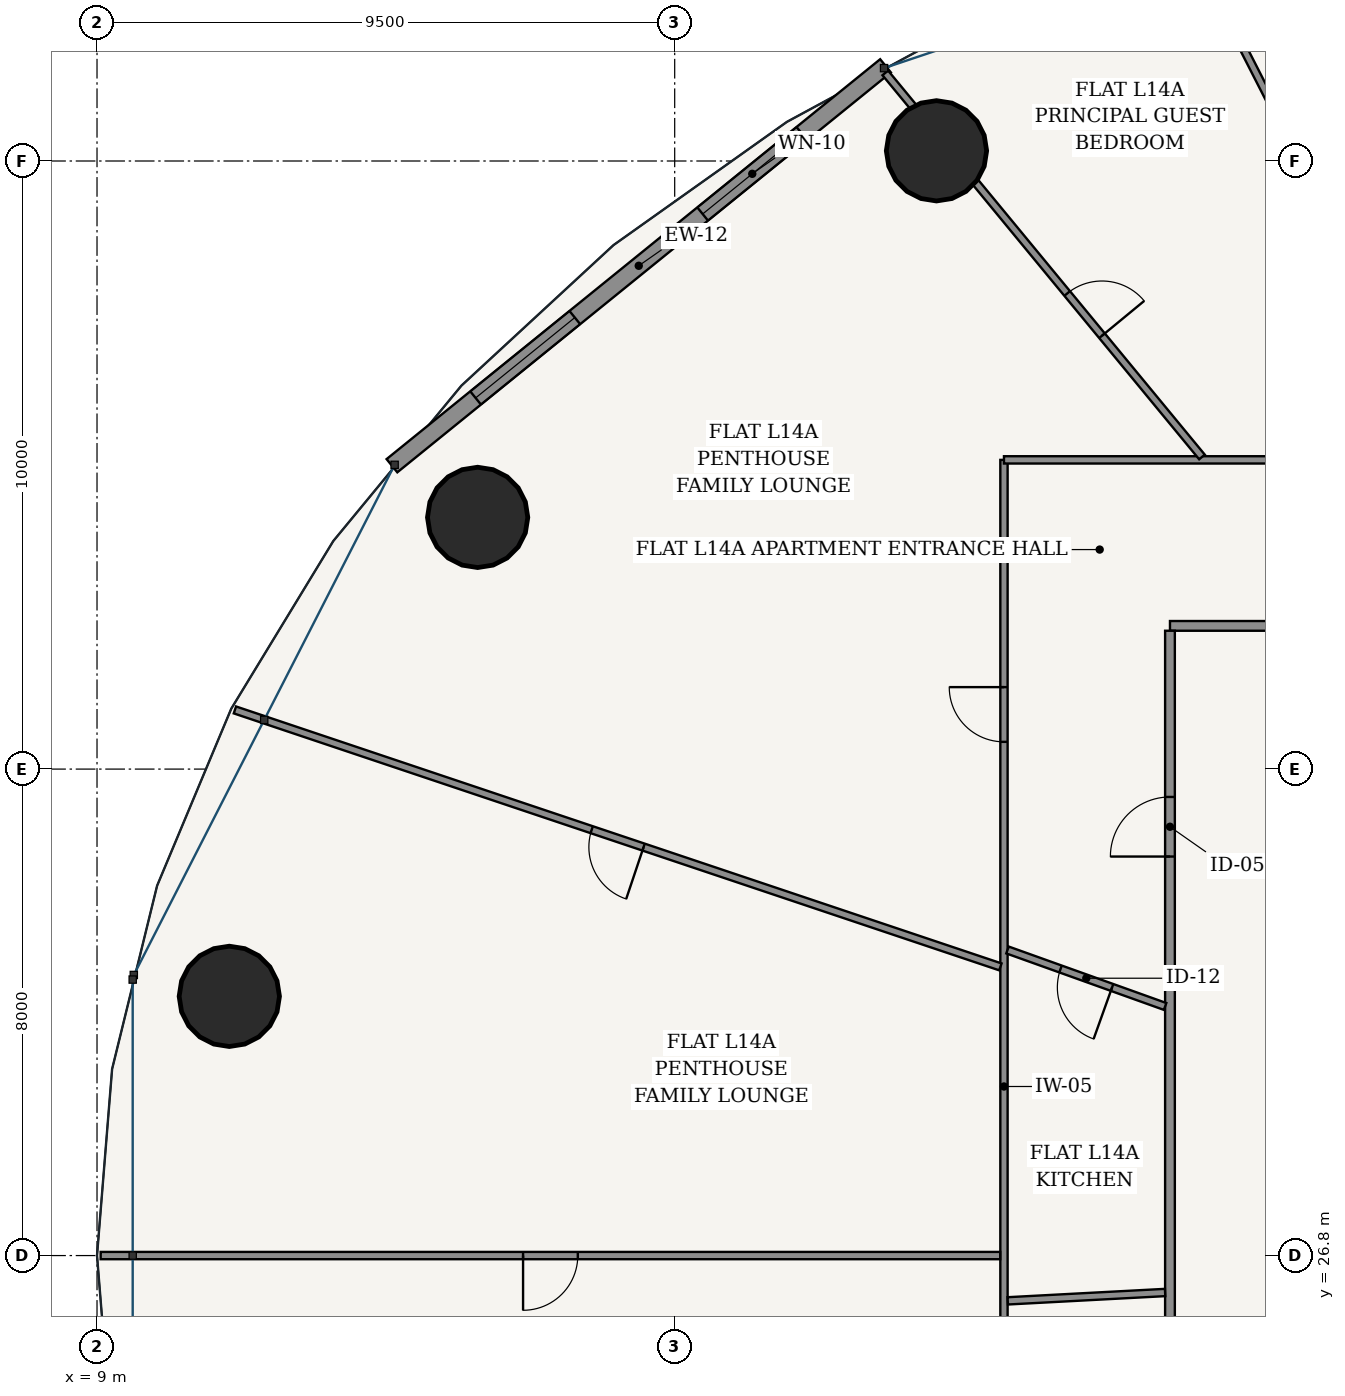
"""IFC4 building model, lengths in metres.
Left out: names, types, materials, properties, quantities, classifications, styles, units other than length and angle.
Written with IfcOpenShell. Run it as: python <this file> out.ifc"""

import sys

from ifc_helpers import new_model, si_unit, direction, frame, frame_2d, origin, origin_2d, place, context, subcontext, project, spatial, rectangle, hollow_circle, extrude, source, transform, mapped, element, fill, save


model = new_model("IFC4")
c1 = context("Model", 3, precision=1e-05, world=origin(), true_north=direction((-0.2419218956, 0.970295726276)))
c2 = subcontext(c1, "Body", "Model", "MODEL_VIEW")
j1 = project(units=[si_unit("LENGTHUNIT", "METRE"), si_unit("PLANEANGLEUNIT", "RADIAN")], contexts=[c1])
p1 = place(None, origin())
s1 = spatial("IfcSite", under=j1, at=p1, CompositionType="ELEMENT")
p2 = place(p1, origin())
s2 = spatial("IfcBuilding", under=s1, at=p2, CompositionType="ELEMENT")
p3 = place(p2, frame((0.0, 0.0, 56.4)))
s3 = spatial("IfcBuildingStorey", under=s2, at=p3, CompositionType="ELEMENT", Elevation=56.4)
for number, where, z_axis, x_axis in (
    (1, (22.805, 44.968, 0.0), (0.0, 0.0, 1.0), (1.0, 0.0, 0.0)),
    (2, (15.259, 38.939, 0.0), (0.0, 0.0, 1.0), (1.0, 0.0, 0.0)),
    (3, (11.176, 31.063, 0.0), (0.0, 0.0, 1.0), (1.0, 0.0, 0.0)),
):
    element("IfcColumn", number, at=place(p3, frame(where, z_axis=z_axis, x_axis=x_axis)), inside=s3, PredefinedType="COLUMN", context=c2, shape_type="SweptSolid", body=[
        extrude(hollow_circle(Radius=0.825, WallThickness=0.05, at=origin_2d()), origin(), (0.0, 0.0, 1.0), 3.6),
    ])
p4 = place(p3, frame((21.967, 46.365, 0.0), z_axis=(0.0, 0.0, 1.0), x_axis=(-0.777005352078, -0.62949398952, 0.0)))
e4 = element("IfcWall", 4, at=p4, inside=s3, PredefinedType="SOLIDWALL", context=c2, shape_type="SweptSolid", body=[
    extrude(rectangle(XDim=10.447, YDim=0.28, at=frame_2d((5.223, 0.0))), origin(), (0.0, 0.0, 1.0), 3.32),
])
p5 = place(p4, frame((1.771, 0.0, 0.85)))
e5 = element("IfcOpeningElement", 5, at=p5, cuts=e4, PredefinedType="OPENING", context=c2, shape_type="SweptSolid", body=[
    extrude(rectangle(XDim=2.1, YDim=1.95, at=frame_2d((1.05, 0.975))), frame((0.0, 0.15, 0.0), z_axis=(0.0, -1.0, 0.0), x_axis=(1.0, 0.0, 0.0)), (0.0, 0.0, 1.0), 0.3),
])
p6 = place(p4, frame((6.576, 0.0, 0.85)))
e6 = element("IfcOpeningElement", 6, at=p6, cuts=e4, PredefinedType="OPENING", context=c2, shape_type="SweptSolid", body=[
    extrude(rectangle(XDim=2.1, YDim=1.95, at=frame_2d((1.05, 0.975))), frame((0.0, 0.15, 0.0), z_axis=(0.0, -1.0, 0.0), x_axis=(1.0, 0.0, 0.0)), (0.0, 0.0, 1.0), 0.3),
])
p7 = place(p3, frame((26.645, 37.155, 0.0), z_axis=(0.0, 0.0, 1.0), x_axis=(1.0, 0.0, 0.0)))
e7 = element("IfcWall", 7, at=p7, inside=s3, PredefinedType="PARTITIONING", context=c2, shape_type="SweptSolid", body=[
    extrude(rectangle(XDim=22.71, YDim=0.16, at=frame_2d((11.355, 0.0))), origin(), (0.0, 0.0, 1.0), 2.688),
])
p8 = place(p3, frame((26.645, 16.525, 0.0), z_axis=(0.0, 0.0, 1.0), x_axis=(0.0, 1.0, 0.0)))
e8 = element("IfcWall", 8, at=p8, inside=s3, PredefinedType="PARTITIONING", context=c2, shape_type="SweptSolid", body=[
    extrude(rectangle(XDim=20.55, YDim=0.16, at=frame_2d((10.275, 0.0))), origin(), (0.0, 0.0, 1.0), 2.688),
])
p9 = place(p8, frame((16.837, 0.0, 0.0)))
e9 = element("IfcOpeningElement", 9, at=p9, cuts=e8, PredefinedType="OPENING", context=c2, shape_type="SweptSolid", body=[
    extrude(rectangle(XDim=0.98, YDim=2.2, at=frame_2d((0.49, 1.1))), frame((0.0, 0.09, 0.0), z_axis=(0.0, -1.0, 0.0), x_axis=(1.0, 0.0, 0.0)), (0.0, 0.0, 1.0), 0.18),
])
p10 = place(p3, frame((23.915, 19.276, 0.0), z_axis=(0.0, 0.0, 1.0), x_axis=(0.0, 1.0, 0.0)))
e10 = element("IfcWall", 10, at=p10, inside=s3, PredefinedType="PARTITIONING", context=c2, shape_type="SweptSolid", body=[
    extrude(rectangle(XDim=20.609, YDim=0.12, at=frame_2d((10.305, 0.0))), origin(), (0.0, 0.0, 1.0), 2.688),
])
p11 = place(p10, frame((15.972, 0.0, 0.0)))
e11 = element("IfcOpeningElement", 11, at=p11, cuts=e10, PredefinedType="OPENING", context=c2, shape_type="SweptSolid", body=[
    extrude(rectangle(XDim=0.9, YDim=2.15, at=frame_2d((0.45, 1.075))), frame((0.0, 0.07, 0.0), z_axis=(0.0, -1.0, 0.0), x_axis=(1.0, 0.0, 0.0)), (0.0, 0.0, 1.0), 0.14),
])
p12 = place(p10, frame((3.058, 0.0, 0.0)))
e12 = element("IfcOpeningElement", 12, at=p12, cuts=e10, PredefinedType="OPENING", context=c2, shape_type="SweptSolid", body=[
    extrude(rectangle(XDim=0.9, YDim=2.15, at=frame_2d((0.45, 1.075))), frame((0.0, 0.07, 0.0), z_axis=(0.0, -1.0, 0.0), x_axis=(1.0, 0.0, 0.0)), (0.0, 0.0, 1.0), 0.14),
])
p13 = place(p3, frame((23.915, 39.885, 0.0), z_axis=(0.0, 0.0, 1.0), x_axis=(1.0, 0.0, 0.0)))
e13 = element("IfcWall", 13, at=p13, inside=s3, PredefinedType="PARTITIONING", context=c2, shape_type="SweptSolid", body=[
    extrude(rectangle(XDim=28.17, YDim=0.12, at=frame_2d((14.085, 0.0))), origin(), (0.0, 0.0, 1.0), 2.688),
])
p14 = place(p13, frame((12.891, 0.0, 0.0)))
e14 = element("IfcOpeningElement", 14, at=p14, cuts=e13, PredefinedType="OPENING", context=c2, shape_type="SweptSolid", body=[
    extrude(rectangle(XDim=0.9, YDim=2.15, at=frame_2d((0.45, 1.075))), frame((0.0, 0.07, 0.0), z_axis=(0.0, -1.0, 0.0), x_axis=(1.0, 0.0, 0.0)), (0.0, 0.0, 1.0), 0.14),
])
p15 = place(p3, frame((31.283, 39.94, 0.0), z_axis=(0.0, 0.0, 1.0), x_axis=(-0.455131303234, 0.890424335256, 0.0)))
e15 = element("IfcWall", 15, at=p15, inside=s3, PredefinedType="PARTITIONING", context=c2, shape_type="SweptSolid", body=[
    extrude(rectangle(XDim=9.562, YDim=0.12, at=frame_2d((4.781, 0.0))), origin(), (0.0, 0.0, 1.0), 2.762),
])
p16 = place(p15, frame((4.331, 0.0, 0.0)))
e16 = element("IfcOpeningElement", 16, at=p16, cuts=e15, PredefinedType="OPENING", context=c2, shape_type="SweptSolid", body=[
    extrude(rectangle(XDim=0.9, YDim=2.15, at=frame_2d((0.45, 1.075))), frame((0.0, 0.07, 0.0), z_axis=(0.0, -1.0, 0.0), x_axis=(1.0, 0.0, 0.0)), (0.0, 0.0, 1.0), 0.14),
])
p17 = place(p3, frame((27.171, 39.933, 0.0), z_axis=(0.0, 0.0, 1.0), x_axis=(-0.636192172227, 0.771530634516, 0.0)))
e17 = element("IfcWall", 17, at=p17, inside=s3, PredefinedType="PARTITIONING", context=c2, shape_type="SweptSolid", body=[
    extrude(rectangle(XDim=8.186, YDim=0.12, at=frame_2d((4.093, 0.0))), origin(), (0.0, 0.0, 1.0), 2.688),
])
p18 = place(p17, frame((2.584, 0.0, 0.0)))
e18 = element("IfcOpeningElement", 18, at=p18, cuts=e17, PredefinedType="OPENING", context=c2, shape_type="SweptSolid", body=[
    extrude(rectangle(XDim=0.9, YDim=2.15, at=frame_2d((0.45, 1.075))), frame((0.0, 0.07, 0.0), z_axis=(0.0, -1.0, 0.0), x_axis=(1.0, 0.0, 0.0)), (0.0, 0.0, 1.0), 0.14),
])
p19 = place(p3, frame((23.856, 31.547, 0.0), z_axis=(0.0, 0.0, 1.0), x_axis=(-0.948017487737, 0.318218231634, 0.0)))
e19 = element("IfcWall", 19, at=p19, inside=s3, PredefinedType="PARTITIONING", context=c2, shape_type="SweptSolid", body=[
    extrude(rectangle(XDim=13.279, YDim=0.12, at=frame_2d((6.639, 0.0))), origin(), (0.0, 0.0, 1.0), 2.762),
])
p20 = place(p19, frame((6.189, 0.0, 0.0)))
e20 = element("IfcOpeningElement", 20, at=p20, cuts=e19, PredefinedType="OPENING", context=c2, shape_type="SweptSolid", body=[
    extrude(rectangle(XDim=0.9, YDim=2.15, at=frame_2d((0.45, 1.075))), frame((0.0, 0.07, 0.0), z_axis=(0.0, -1.0, 0.0), x_axis=(1.0, 0.0, 0.0)), (0.0, 0.0, 1.0), 0.14),
])
p21 = place(p3, frame((23.853, 26.8, 0.0), z_axis=(0.0, 0.0, 1.0), x_axis=(-1.0, 0.0, 0.0)))
e21 = element("IfcWall", 21, at=p21, inside=s3, PredefinedType="PARTITIONING", context=c2, shape_type="SweptSolid", body=[
    extrude(rectangle(XDim=14.793, YDim=0.12, at=frame_2d((7.396, 0.0))), origin(), (0.0, 0.0, 1.0), 2.762),
])
p22 = place(p21, frame((6.947, 0.0, 0.0)))
e22 = element("IfcOpeningElement", 22, at=p22, cuts=e21, PredefinedType="OPENING", context=c2, shape_type="SweptSolid", body=[
    extrude(rectangle(XDim=0.9, YDim=2.15, at=frame_2d((0.45, 1.075))), frame((0.0, 0.07, 0.0), z_axis=(0.0, -1.0, 0.0), x_axis=(1.0, 0.0, 0.0)), (0.0, 0.0, 1.0), 0.14),
])
p23 = place(p3, frame((26.565, 30.896, 0.0), z_axis=(0.0, 0.0, 1.0), x_axis=(-0.941406362049, 0.337274460186, 0.0)))
e23 = element("IfcWall", 23, at=p23, inside=s3, PredefinedType="PARTITIONING", context=c2, shape_type="SweptSolid", body=[
    extrude(rectangle(XDim=2.753, YDim=0.12, at=frame_2d((1.376, 0.0))), origin(), (0.0, 0.0, 1.0), 3.32),
])
p24 = place(p23, frame((0.927, 0.0, 0.0)))
e24 = element("IfcOpeningElement", 24, at=p24, cuts=e23, PredefinedType="OPENING", context=c2, shape_type="SweptSolid", body=[
    extrude(rectangle(XDim=0.9, YDim=2.15, at=frame_2d((0.45, 1.075))), frame((0.0, 0.07, 0.0), z_axis=(0.0, -1.0, 0.0), x_axis=(1.0, 0.0, 0.0)), (0.0, 0.0, 1.0), 0.14),
])
p25 = place(p3, frame((26.565, 26.193, 0.0), z_axis=(0.0, 0.0, 1.0), x_axis=(-0.99859273586, -0.053033460078, 0.0)))
e25 = element("IfcWall", 25, at=p25, inside=s3, PredefinedType="PARTITIONING", context=c2, shape_type="SweptSolid", body=[
    extrude(rectangle(XDim=2.592, YDim=0.12, at=frame_2d((1.296, 0.0))), origin(), (0.0, 0.0, 1.0), 3.32),
])
m1 = source(origin(), c2, "Body", "SweptSolid", [
    extrude(rectangle(XDim=2.1, YDim=1.95, at=frame_2d((1.05, 0.975))), frame((0.0, 0.03, 0.0), z_axis=(0.0, -1.0, 0.0), x_axis=(1.0, 0.0, 0.0)), (0.0, 0.0, 1.0), 0.06),
])
p26 = place(p5, origin())
e26 = element("IfcWindow", 26, at=p26, inside=s3, PartitioningType="SINGLE_PANEL", PredefinedType="WINDOW", context=c2, shape_type="MappedRepresentation", body=[
    mapped(m1, transform((0.0, 0.0, 0.0), scale=1.0)),
])
fill(e5, e26)
p27 = place(p6, origin())
e27 = element("IfcWindow", 27, at=p27, inside=s3, PartitioningType="SINGLE_PANEL", PredefinedType="WINDOW", context=c2, shape_type="MappedRepresentation", body=[
    mapped(m1, transform((0.0, 0.0, 0.0), scale=1.0)),
])
fill(e6, e27)
m2 = source(origin(), c2, "Body", "SweptSolid", [
    extrude(rectangle(XDim=0.98, YDim=2.2, at=frame_2d((0.49, 1.1))), frame((0.0, 0.025, 0.0), z_axis=(0.0, -1.0, 0.0), x_axis=(1.0, 0.0, 0.0)), (0.0, 0.0, 1.0), 0.05),
])
p28 = place(p9, origin())
e28 = element("IfcDoor", 28, at=p28, inside=s3, OperationType="SINGLE_SWING_LEFT", PredefinedType="DOOR", context=c2, shape_type="MappedRepresentation", body=[
    mapped(m2, transform((0.0, 0.0, 0.0), scale=1.0)),
])
fill(e9, e28)
m3 = source(origin(), c2, "Body", "SweptSolid", [
    extrude(rectangle(XDim=0.9, YDim=2.15, at=frame_2d((0.45, 1.075))), frame((0.0, 0.025, 0.0), z_axis=(0.0, -1.0, 0.0), x_axis=(1.0, 0.0, 0.0)), (0.0, 0.0, 1.0), 0.05),
])
p29 = place(p24, origin())
e29 = element("IfcDoor", 29, at=p29, inside=s3, OperationType="SINGLE_SWING_LEFT", PredefinedType="DOOR", context=c2, shape_type="MappedRepresentation", body=[
    mapped(m3, transform((0.0, 0.0, 0.0), scale=1.0)),
])
fill(e24, e29)
p30 = place(p11, origin())
e30 = element("IfcDoor", 30, at=p30, inside=s3, OperationType="SINGLE_SWING_RIGHT", PredefinedType="DOOR", context=c2, shape_type="MappedRepresentation", body=[
    mapped(m3, transform((0.0, 0.0, 0.0), scale=1.0)),
])
fill(e11, e30)
p31 = place(p20, origin())
e31 = element("IfcDoor", 31, at=p31, inside=s3, OperationType="SINGLE_SWING_LEFT", PredefinedType="DOOR", context=c2, shape_type="MappedRepresentation", body=[
    mapped(m3, transform((0.0, 0.0, 0.0), scale=1.0)),
])
fill(e20, e31)
p32 = place(p22, origin())
e32 = element("IfcDoor", 32, at=p32, inside=s3, OperationType="SINGLE_SWING_RIGHT", PredefinedType="DOOR", context=c2, shape_type="MappedRepresentation", body=[
    mapped(m3, transform((0.0, 0.0, 0.0), scale=1.0)),
])
fill(e22, e32)
p33 = place(p18, frame((0.9, 0.0, 0.0), z_axis=(0.0, 0.0, 1.0), x_axis=(-1.0, 0.0, 0.0)))
e33 = element("IfcDoor", 33, at=p33, inside=s3, OperationType="SINGLE_SWING_RIGHT", PredefinedType="DOOR", context=c2, shape_type="MappedRepresentation", body=[
    mapped(m3, transform((0.0, 0.0, 0.0), scale=1.0)),
])
fill(e18, e33)
save(model, sys.argv[1])
